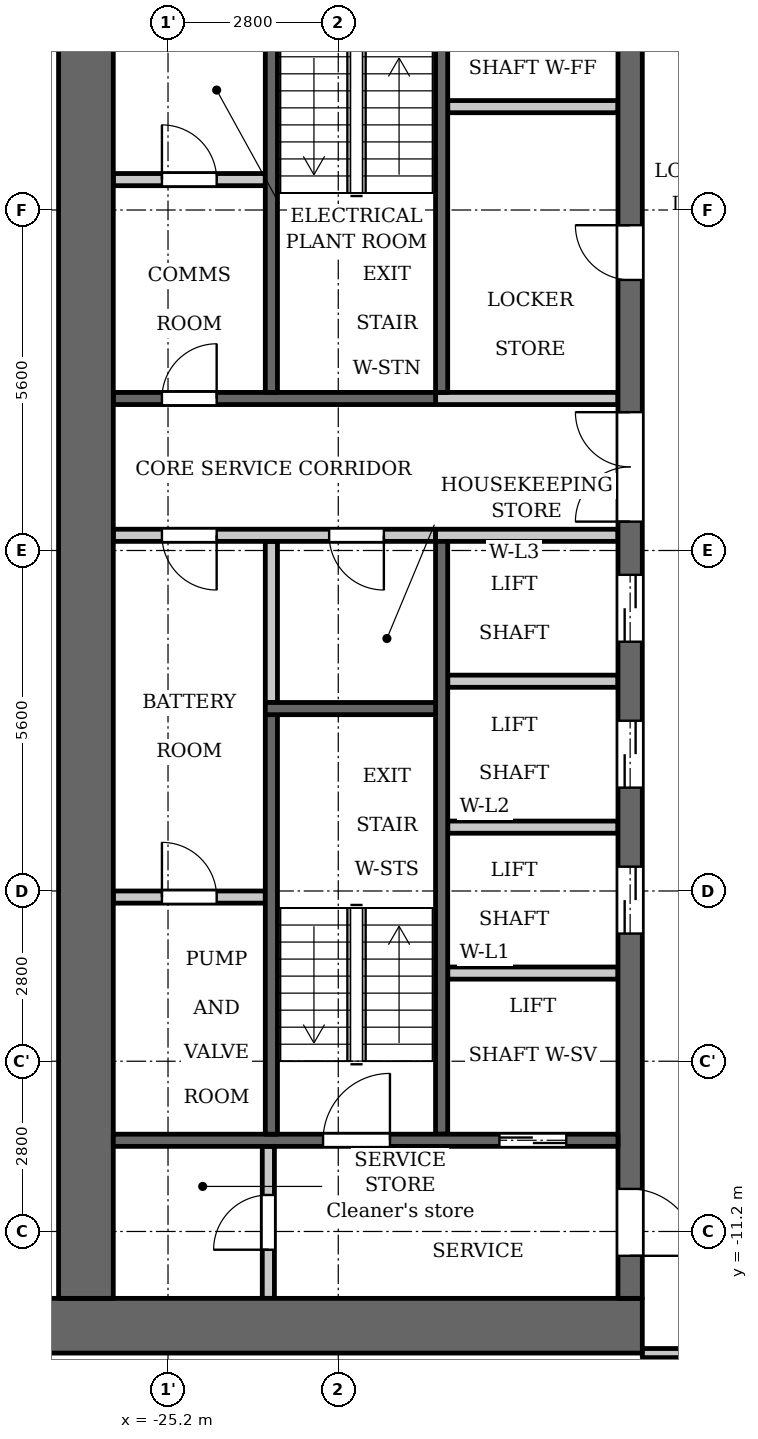
"""IFC4 building model, lengths in metres.
Left out: names, types, materials, properties, quantities, classifications, styles, units other than length and angle.
Written with IfcOpenShell. Run it as: python <this file> out.ifc"""

import sys

from ifc_helpers import new_model, si_unit, direction, frame, frame_2d, origin, place, context, subcontext, project, spatial, rectangle, extrude, element, fill, save


model = new_model("IFC4")
c1 = context("Model", 3, precision=1e-05, world=origin(), true_north=direction((0.0, 1.0)))
c2 = subcontext(c1, "Body", "Model", "MODEL_VIEW")
j1 = project(units=[si_unit("LENGTHUNIT", "METRE"), si_unit("PLANEANGLEUNIT", "RADIAN")], contexts=[c1])
p1 = place(None, origin())
s1 = spatial("IfcSite", under=j1, at=p1, CompositionType="ELEMENT")
p2 = place(p1, origin())
s2 = spatial("IfcBuilding", under=s1, at=p2, CompositionType="ELEMENT")
p3 = place(p2, frame((0.0, 0.0, 97.3)))
s3 = spatial("IfcBuildingStorey", under=s2, at=p3, CompositionType="ELEMENT", Elevation=97.3)
p4 = place(p3, frame((-23.5, -2.5, 0.0), z_axis=(0.0, 0.0, 1.0), x_axis=(0.0, 1.0, 0.0)))
e1 = element("IfcWall", 1, at=p4, inside=s3, PredefinedType="PARTITIONING", context=c2, shape_type="SweptSolid", body=[
    extrude(rectangle(XDim=2.65, YDim=0.2, at=frame_2d((1.325, 0.0))), origin(), (0.0, 0.0, 1.0), 3.2),
])
p5 = place(p3, frame((-20.7, 2.6, 0.0), z_axis=(0.0, 0.0, 1.0), x_axis=(0.0, 1.0, 0.0)))
e2 = element("IfcWall", 2, at=p5, inside=s3, PredefinedType="SHEAR", context=c2, shape_type="SweptSolid", body=[
    extrude(rectangle(XDim=7.0, YDim=0.2, at=frame_2d((3.5, 0.0))), origin(), (0.0, 0.0, 1.0), 3.2),
])
p6 = place(p3, frame((-20.7, -9.6, 0.0), z_axis=(0.0, 0.0, 1.0), x_axis=(0.0, 1.0, 0.0)))
e3 = element("IfcWall", 3, at=p6, inside=s3, PredefinedType="SHEAR", context=c2, shape_type="SweptSolid", body=[
    extrude(rectangle(XDim=9.75, YDim=0.2, at=frame_2d((4.875, 0.0))), origin(), (0.0, 0.0, 1.0), 3.2),
])
p7 = place(p3, frame((-20.8, 2.5, 0.0), z_axis=(0.0, 0.0, 1.0), x_axis=(-1.0, 0.0, 0.0)))
e4 = element("IfcWall", 4, at=p7, inside=s3, PredefinedType="SHEAR", context=c2, shape_type="SweptSolid", body=[
    extrude(rectangle(XDim=5.3, YDim=0.2, at=frame_2d((2.65, 0.0))), origin(), (0.0, 0.0, 1.0), 3.2),
])
p8 = place(p7, frame((3.6, 0.0, 0.0)))
e5 = element("IfcOpeningElement", 5, at=p8, cuts=e4, PredefinedType="OPENING", context=c2, shape_type="SweptSolid", body=[
    extrude(rectangle(XDim=0.9, YDim=2.1, at=frame_2d((0.45, 1.05))), frame((0.0, 0.11, 0.0), z_axis=(0.0, -1.0, 0.0), x_axis=(1.0, 0.0, 0.0)), (0.0, 0.0, 1.0), 0.22),
])
p9 = place(p3, frame((-20.8, 0.25, 0.0), z_axis=(0.0, 0.0, 1.0), x_axis=(-1.0, 0.0, 0.0)))
e6 = element("IfcWall", 6, at=p9, inside=s3, PredefinedType="PARTITIONING", context=c2, shape_type="SweptSolid", body=[
    extrude(rectangle(XDim=5.3, YDim=0.2, at=frame_2d((2.65, 0.0))), origin(), (0.0, 0.0, 1.0), 3.2),
])
p10 = place(p9, frame((0.85, 0.0, 0.0)))
e7 = element("IfcOpeningElement", 7, at=p10, cuts=e6, PredefinedType="OPENING", context=c2, shape_type="SweptSolid", body=[
    extrude(rectangle(XDim=0.9, YDim=2.1, at=frame_2d((0.45, 1.05))), frame((0.0, 0.11, 0.0), z_axis=(0.0, -1.0, 0.0), x_axis=(1.0, 0.0, 0.0)), (0.0, 0.0, 1.0), 0.22),
])
p11 = place(p9, frame((3.6, 0.0, 0.0)))
e8 = element("IfcOpeningElement", 8, at=p11, cuts=e6, PredefinedType="OPENING", context=c2, shape_type="SweptSolid", body=[
    extrude(rectangle(XDim=0.9, YDim=2.1, at=frame_2d((0.45, 1.05))), frame((0.0, 0.11, 0.0), z_axis=(0.0, -1.0, 0.0), x_axis=(1.0, 0.0, 0.0)), (0.0, 0.0, 1.0), 0.22),
])
p12 = place(p3, frame((-17.4, -12.75, 0.0), z_axis=(0.0, 0.0, 1.0), x_axis=(-1.0, 0.0, 0.0)))
e9 = element("IfcWall", 9, at=p12, inside=s3, PredefinedType="SHEAR", context=c2, shape_type="SweptSolid", body=[
    extrude(rectangle(XDim=10.4, YDim=0.9, at=frame_2d((5.2, 0.0))), origin(), (0.0, 0.0, 1.0), 3.2),
])
p13 = place(p3, frame((-17.6, -12.3, 0.0), z_axis=(0.0, 0.0, 1.0), x_axis=(0.0, 1.0, 0.0)))
e10 = element("IfcWall", 10, at=p13, inside=s3, PredefinedType="SHEAR", context=c2, shape_type="SweptSolid", body=[
    extrude(rectangle(XDim=24.6, YDim=0.4, at=frame_2d((12.3, 0.0))), origin(), (0.0, 0.0, 1.0), 3.2),
])
p14 = place(p13, frame((6.0, 0.0, 0.0)))
e11 = element("IfcOpeningElement", 11, at=p14, cuts=e10, PredefinedType="OPENING", context=c2, shape_type="SweptSolid", body=[
    extrude(rectangle(XDim=1.1, YDim=2.1, at=frame_2d((0.55, 1.05))), frame((0.0, 0.21, 0.0), z_axis=(0.0, -1.0, 0.0), x_axis=(1.0, 0.0, 0.0)), (0.0, 0.0, 1.0), 0.42),
])
p15 = place(p13, frame((8.4, 0.0, 0.0)))
e12 = element("IfcOpeningElement", 12, at=p15, cuts=e10, PredefinedType="OPENING", context=c2, shape_type="SweptSolid", body=[
    extrude(rectangle(XDim=1.1, YDim=2.1, at=frame_2d((0.55, 1.05))), frame((0.0, 0.21, 0.0), z_axis=(0.0, -1.0, 0.0), x_axis=(1.0, 0.0, 0.0)), (0.0, 0.0, 1.0), 0.42),
])
p16 = place(p13, frame((10.8, 0.0, 0.0)))
e13 = element("IfcOpeningElement", 13, at=p16, cuts=e10, PredefinedType="OPENING", context=c2, shape_type="SweptSolid", body=[
    extrude(rectangle(XDim=1.1, YDim=2.1, at=frame_2d((0.55, 1.05))), frame((0.0, 0.21, 0.0), z_axis=(0.0, -1.0, 0.0), x_axis=(1.0, 0.0, 0.0)), (0.0, 0.0, 1.0), 0.42),
])
p17 = place(p13, frame((16.75, 0.0, 0.0)))
e14 = element("IfcOpeningElement", 14, at=p17, cuts=e10, PredefinedType="OPENING", context=c2, shape_type="SweptSolid", body=[
    extrude(rectangle(XDim=0.9, YDim=2.1, at=frame_2d((0.45, 1.05))), frame((0.0, 0.21, 0.0), z_axis=(0.0, -1.0, 0.0), x_axis=(1.0, 0.0, 0.0)), (0.0, 0.0, 1.0), 0.42),
])
p18 = place(p13, frame((22.8, 0.0, 0.0)))
e15 = element("IfcOpeningElement", 15, at=p18, cuts=e10, PredefinedType="OPENING", context=c2, shape_type="SweptSolid", body=[
    extrude(rectangle(XDim=1.1, YDim=2.1, at=frame_2d((0.55, 1.05))), frame((0.0, 0.21, 0.0), z_axis=(0.0, -1.0, 0.0), x_axis=(1.0, 0.0, 0.0)), (0.0, 0.0, 1.0), 0.42),
])
p19 = place(p13, frame((0.7, 0.0, 0.0)))
e16 = element("IfcOpeningElement", 16, at=p19, cuts=e10, PredefinedType="OPENING", context=c2, shape_type="SweptSolid", body=[
    extrude(rectangle(XDim=1.1, YDim=2.1, at=frame_2d((0.55, 1.05))), frame((0.0, 0.21, 0.0), z_axis=(0.0, -1.0, 0.0), x_axis=(1.0, 0.0, 0.0)), (0.0, 0.0, 1.0), 0.42),
])
p20 = place(p13, frame((12.775, 0.0, 0.0)))
e17 = element("IfcOpeningElement", 17, at=p20, cuts=e10, PredefinedType="OPENING", context=c2, shape_type="SweptSolid", body=[
    extrude(rectangle(XDim=1.8, YDim=2.1, at=frame_2d((0.9, 1.05))), frame((0.0, 0.21, 0.0), z_axis=(0.0, -1.0, 0.0), x_axis=(1.0, 0.0, 0.0)), (0.0, 0.0, 1.0), 0.42),
])
p21 = place(p3, frame((-26.55, -12.3, 0.0), z_axis=(0.0, 0.0, 1.0), x_axis=(0.0, 1.0, 0.0)))
e18 = element("IfcWall", 18, at=p21, inside=s3, PredefinedType="SHEAR", context=c2, shape_type="SweptSolid", body=[
    extrude(rectangle(XDim=24.6, YDim=0.9, at=frame_2d((12.3, 0.0))), origin(), (0.0, 0.0, 1.0), 3.2),
])
p22 = place(p3, frame((-23.55, -12.3, 0.0), z_axis=(0.0, 0.0, 1.0), x_axis=(0.0, 1.0, 0.0)))
e19 = element("IfcWall", 19, at=p22, inside=s3, PredefinedType="PARTITIONING", context=c2, shape_type="SweptSolid", body=[
    extrude(rectangle(XDim=2.5, YDim=0.2, at=frame_2d((1.25, 0.0))), origin(), (0.0, 0.0, 1.0), 3.2),
])
p23 = place(p22, frame((0.8, 0.0, 0.0)))
e20 = element("IfcOpeningElement", 20, at=p23, cuts=e19, PredefinedType="OPENING", context=c2, shape_type="SweptSolid", body=[
    extrude(rectangle(XDim=0.9, YDim=2.1, at=frame_2d((0.45, 1.05))), frame((0.0, 0.11, 0.0), z_axis=(0.0, -1.0, 0.0), x_axis=(1.0, 0.0, 0.0)), (0.0, 0.0, 1.0), 0.22),
])
p24 = place(p3, frame((-23.6, -5.7, 0.0), z_axis=(0.0, 0.0, 1.0), x_axis=(-1.0, 0.0, 0.0)))
e21 = element("IfcWall", 21, at=p24, inside=s3, PredefinedType="PARTITIONING", context=c2, shape_type="SweptSolid", body=[
    extrude(rectangle(XDim=2.5, YDim=0.2, at=frame_2d((1.25, 0.0))), origin(), (0.0, 0.0, 1.0), 3.2),
])
p25 = place(p24, frame((0.8, 0.0, 0.0)))
e22 = element("IfcOpeningElement", 22, at=p25, cuts=e21, PredefinedType="OPENING", context=c2, shape_type="SweptSolid", body=[
    extrude(rectangle(XDim=0.9, YDim=2.1, at=frame_2d((0.45, 1.05))), frame((0.0, 0.11, 0.0), z_axis=(0.0, -1.0, 0.0), x_axis=(1.0, 0.0, 0.0)), (0.0, 0.0, 1.0), 0.22),
])
p26 = place(p3, frame((-23.6, 6.1, 0.0), z_axis=(0.0, 0.0, 1.0), x_axis=(-1.0, 0.0, 0.0)))
e23 = element("IfcWall", 23, at=p26, inside=s3, PredefinedType="PARTITIONING", context=c2, shape_type="SweptSolid", body=[
    extrude(rectangle(XDim=2.5, YDim=0.2, at=frame_2d((1.25, 0.0))), origin(), (0.0, 0.0, 1.0), 3.2),
])
p27 = place(p26, frame((0.8, 0.0, 0.0)))
e24 = element("IfcOpeningElement", 24, at=p27, cuts=e23, PredefinedType="OPENING", context=c2, shape_type="SweptSolid", body=[
    extrude(rectangle(XDim=0.9, YDim=2.1, at=frame_2d((0.45, 1.05))), frame((0.0, 0.11, 0.0), z_axis=(0.0, -1.0, 0.0), x_axis=(1.0, 0.0, 0.0)), (0.0, 0.0, 1.0), 0.22),
])
p28 = place(p3, frame((-17.8, -9.7, 0.0), z_axis=(0.0, 0.0, 1.0), x_axis=(-1.0, 0.0, 0.0)))
e25 = element("IfcWall", 25, at=p28, inside=s3, PredefinedType="SHEAR", context=c2, shape_type="SweptSolid", body=[
    extrude(rectangle(XDim=8.3, YDim=0.2, at=frame_2d((4.15, 0.0))), origin(), (0.0, 0.0, 1.0), 3.2),
])
p29 = place(p28, frame((0.85, 0.0, 0.0)))
e26 = element("IfcOpeningElement", 26, at=p29, cuts=e25, PredefinedType="OPENING", context=c2, shape_type="SweptSolid", body=[
    extrude(rectangle(XDim=1.1, YDim=2.1, at=frame_2d((0.55, 1.05))), frame((0.0, 0.11, 0.0), z_axis=(0.0, -1.0, 0.0), x_axis=(1.0, 0.0, 0.0)), (0.0, 0.0, 1.0), 0.22),
])
p30 = place(p28, frame((3.75, 0.0, 0.0)))
e27 = element("IfcOpeningElement", 27, at=p30, cuts=e25, PredefinedType="OPENING", context=c2, shape_type="SweptSolid", body=[
    extrude(rectangle(XDim=1.1, YDim=2.1, at=frame_2d((0.55, 1.05))), frame((0.0, 0.11, 0.0), z_axis=(0.0, -1.0, 0.0), x_axis=(1.0, 0.0, 0.0)), (0.0, 0.0, 1.0), 0.22),
])
for number, where, z_axis, x_axis in (
    (28, (-17.8, -6.95, 0.0), (0.0, 0.0, 1.0), (-1.0, 0.0, 0.0)),
    (29, (-17.8, -4.55, 0.0), (0.0, 0.0, 1.0), (-1.0, 0.0, 0.0)),
    (30, (-17.8, -2.15, 0.0), (0.0, 0.0, 1.0), (-1.0, 0.0, 0.0)),
):
    element("IfcWall", number, at=place(p3, frame(where, z_axis=z_axis, x_axis=x_axis)), inside=s3, PredefinedType="PARTITIONING", context=c2, shape_type="SweptSolid", body=[
        extrude(rectangle(XDim=2.8, YDim=0.2, at=frame_2d((1.4, 0.0))), origin(), (0.0, 0.0, 1.0), 3.2),
    ])
for number, where, z_axis, x_axis in (
    (31, (-17.8, 0.25, 0.0), (0.0, 0.0, 1.0), (-1.0, 0.0, 0.0)),
    (32, (-17.8, 2.5, 0.0), (0.0, 0.0, 1.0), (-1.0, 0.0, 0.0)),
):
    element("IfcWall", number, at=place(p3, frame(where, z_axis=z_axis, x_axis=x_axis)), inside=s3, PredefinedType="PARTITIONING", context=c2, shape_type="SweptSolid", body=[
        extrude(rectangle(XDim=3.0, YDim=0.2, at=frame_2d((1.5, 0.0))), origin(), (0.0, 0.0, 1.0), 3.2),
    ])
p31 = place(p3, frame((-17.8, 7.3, 0.0), z_axis=(0.0, 0.0, 1.0), x_axis=(-1.0, 0.0, 0.0)))
e33 = element("IfcWall", 33, at=p31, inside=s3, PredefinedType="PARTITIONING", context=c2, shape_type="SweptSolid", body=[
    extrude(rectangle(XDim=2.8, YDim=0.2, at=frame_2d((1.4, 0.0))), origin(), (0.0, 0.0, 1.0), 3.2),
])
p32 = place(p3, frame((-23.5, 2.6, 0.0), z_axis=(0.0, 0.0, 1.0), x_axis=(0.0, 1.0, 0.0)))
e34 = element("IfcWall", 34, at=p32, inside=s3, PredefinedType="SHEAR", context=c2, shape_type="SweptSolid", body=[
    extrude(rectangle(XDim=7.0, YDim=0.2, at=frame_2d((3.5, 0.0))), origin(), (0.0, 0.0, 1.0), 3.2),
])
p33 = place(p3, frame((-23.5, -9.6, 0.0), z_axis=(0.0, 0.0, 1.0), x_axis=(0.0, 1.0, 0.0)))
e35 = element("IfcWall", 35, at=p33, inside=s3, PredefinedType="SHEAR", context=c2, shape_type="SweptSolid", body=[
    extrude(rectangle(XDim=6.9, YDim=0.2, at=frame_2d((3.45, 0.0))), origin(), (0.0, 0.0, 1.0), 3.2),
])
p34 = place(p3, frame((-20.8, -2.6, 0.0), z_axis=(0.0, 0.0, 1.0), x_axis=(-1.0, 0.0, 0.0)))
e36 = element("IfcWall", 36, at=p34, inside=s3, PredefinedType="SHEAR", context=c2, shape_type="SweptSolid", body=[
    extrude(rectangle(XDim=2.8, YDim=0.2, at=frame_2d((1.4, 0.0))), origin(), (0.0, 0.0, 1.0), 3.2),
])
p35 = place(p3, frame((-17.4, -13.2, 0.0), z_axis=(0.0, 0.0, 1.0), x_axis=(1.0, 0.0, 0.0)))
e37 = element("IfcWall", 37, at=p35, inside=s3, PredefinedType="PARTITIONING", context=c2, shape_type="SweptSolid", body=[
    extrude(rectangle(XDim=34.8, YDim=0.15, at=frame_2d((17.4, 0.0))), origin(), (0.0, 0.0, 1.0), 3.2),
])
p36 = place(p35, frame((0.65, 0.0, 0.0)))
e38 = element("IfcOpeningElement", 38, at=p36, cuts=e37, PredefinedType="OPENING", context=c2, shape_type="SweptSolid", body=[
    extrude(rectangle(XDim=1.0, YDim=2.1, at=frame_2d((0.5, 1.05))), frame((0.0, 0.085, 0.0), z_axis=(0.0, -1.0, 0.0), x_axis=(1.0, 0.0, 0.0)), (0.0, 0.0, 1.0), 0.17),
])
p37 = place(p35, frame((33.05, 0.0, 0.0)))
e39 = element("IfcOpeningElement", 39, at=p37, cuts=e37, PredefinedType="OPENING", context=c2, shape_type="SweptSolid", body=[
    extrude(rectangle(XDim=1.0, YDim=2.1, at=frame_2d((0.5, 1.05))), frame((0.0, 0.085, 0.0), z_axis=(0.0, -1.0, 0.0), x_axis=(1.0, 0.0, 0.0)), (0.0, 0.0, 1.0), 0.17),
])
p38 = place(p35, frame((4.55, 0.0, 0.0)))
e40 = element("IfcOpeningElement", 40, at=p38, cuts=e37, PredefinedType="OPENING", context=c2, shape_type="SweptSolid", body=[
    extrude(rectangle(XDim=1.0, YDim=2.1, at=frame_2d((0.5, 1.05))), frame((0.0, 0.085, 0.0), z_axis=(0.0, -1.0, 0.0), x_axis=(1.0, 0.0, 0.0)), (0.0, 0.0, 1.0), 0.17),
])
p39 = place(p35, frame((21.35, 0.0, 0.0)))
e41 = element("IfcOpeningElement", 41, at=p39, cuts=e37, PredefinedType="OPENING", context=c2, shape_type="SweptSolid", body=[
    extrude(rectangle(XDim=1.0, YDim=2.1, at=frame_2d((0.5, 1.05))), frame((0.0, 0.085, 0.0), z_axis=(0.0, -1.0, 0.0), x_axis=(1.0, 0.0, 0.0)), (0.0, 0.0, 1.0), 0.17),
])
p40 = place(p35, frame((30.75, 0.0, 0.0)))
e42 = element("IfcOpeningElement", 42, at=p40, cuts=e37, PredefinedType="OPENING", context=c2, shape_type="SweptSolid", body=[
    extrude(rectangle(XDim=1.0, YDim=2.1, at=frame_2d((0.5, 1.05))), frame((0.0, 0.085, 0.0), z_axis=(0.0, -1.0, 0.0), x_axis=(1.0, 0.0, 0.0)), (0.0, 0.0, 1.0), 0.17),
])
p41 = place(p29, origin())
e43 = element("IfcDoor", 43, at=p41, inside=s3, OperationType="DOUBLE_DOOR_SLIDING", PredefinedType="DOOR", context=c2, shape_type="SweptSolid", body=[
    extrude(rectangle(XDim=1.1, YDim=2.1, at=frame_2d((0.55, 1.05))), frame((0.0, 0.025, 0.0), z_axis=(0.0, -1.0, 0.0), x_axis=(1.0, 0.0, 0.0)), (0.0, 0.0, 1.0), 0.05),
])
fill(e26, e43)
p42 = place(p14, origin())
e44 = element("IfcDoor", 44, at=p42, inside=s3, OperationType="DOUBLE_DOOR_SLIDING", PredefinedType="DOOR", context=c2, shape_type="SweptSolid", body=[
    extrude(rectangle(XDim=1.1, YDim=2.1, at=frame_2d((0.55, 1.05))), frame((0.0, 0.025, 0.0), z_axis=(0.0, -1.0, 0.0), x_axis=(1.0, 0.0, 0.0)), (0.0, 0.0, 1.0), 0.05),
])
fill(e11, e44)
p43 = place(p15, origin())
e45 = element("IfcDoor", 45, at=p43, inside=s3, OperationType="DOUBLE_DOOR_SLIDING", PredefinedType="DOOR", context=c2, shape_type="SweptSolid", body=[
    extrude(rectangle(XDim=1.1, YDim=2.1, at=frame_2d((0.55, 1.05))), frame((0.0, 0.025, 0.0), z_axis=(0.0, -1.0, 0.0), x_axis=(1.0, 0.0, 0.0)), (0.0, 0.0, 1.0), 0.05),
])
fill(e12, e45)
p44 = place(p16, origin())
e46 = element("IfcDoor", 46, at=p44, inside=s3, OperationType="DOUBLE_DOOR_SLIDING", PredefinedType="DOOR", context=c2, shape_type="SweptSolid", body=[
    extrude(rectangle(XDim=1.1, YDim=2.1, at=frame_2d((0.55, 1.05))), frame((0.0, 0.025, 0.0), z_axis=(0.0, -1.0, 0.0), x_axis=(1.0, 0.0, 0.0)), (0.0, 0.0, 1.0), 0.05),
])
fill(e13, e46)
p45 = place(p17, origin())
e47 = element("IfcDoor", 47, at=p45, inside=s3, OperationType="SINGLE_SWING_LEFT", PredefinedType="DOOR", context=c2, shape_type="SweptSolid", body=[
    extrude(rectangle(XDim=0.9, YDim=2.1, at=frame_2d((0.45, 1.05))), frame((0.0, 0.025, 0.0), z_axis=(0.0, -1.0, 0.0), x_axis=(1.0, 0.0, 0.0)), (0.0, 0.0, 1.0), 0.05),
])
fill(e14, e47)
p46 = place(p19, origin())
e48 = element("IfcDoor", 48, at=p46, inside=s3, OperationType="SINGLE_SWING_LEFT", PredefinedType="DOOR", context=c2, shape_type="SweptSolid", body=[
    extrude(rectangle(XDim=1.1, YDim=2.1, at=frame_2d((0.55, 1.05))), frame((0.0, 0.025, 0.0), z_axis=(0.0, -1.0, 0.0), x_axis=(1.0, 0.0, 0.0)), (0.0, 0.0, 1.0), 0.05),
])
fill(e16, e48)
p47 = place(p23, origin())
e49 = element("IfcDoor", 49, at=p47, inside=s3, OperationType="SINGLE_SWING_RIGHT", PredefinedType="DOOR", context=c2, shape_type="SweptSolid", body=[
    extrude(rectangle(XDim=0.9, YDim=2.1, at=frame_2d((0.45, 1.05))), frame((0.0, 0.025, 0.0), z_axis=(0.0, -1.0, 0.0), x_axis=(1.0, 0.0, 0.0)), (0.0, 0.0, 1.0), 0.05),
])
fill(e20, e49)
p48 = place(p30, origin())
e50 = element("IfcDoor", 50, at=p48, inside=s3, OperationType="SINGLE_SWING_LEFT", PredefinedType="DOOR", context=c2, shape_type="SweptSolid", body=[
    extrude(rectangle(XDim=1.1, YDim=2.1, at=frame_2d((0.55, 1.05))), frame((0.0, 0.025, 0.0), z_axis=(0.0, -1.0, 0.0), x_axis=(1.0, 0.0, 0.0)), (0.0, 0.0, 1.0), 0.05),
])
fill(e27, e50)
p49 = place(p20, origin())
e51 = element("IfcDoor", 51, at=p49, inside=s3, OperationType="DOUBLE_DOOR_SINGLE_SWING", PredefinedType="DOOR", context=c2, shape_type="SweptSolid", body=[
    extrude(rectangle(XDim=1.8, YDim=2.1, at=frame_2d((0.9, 1.05))), frame((0.0, 0.025, 0.0), z_axis=(0.0, -1.0, 0.0), x_axis=(1.0, 0.0, 0.0)), (0.0, 0.0, 1.0), 0.05),
])
fill(e17, e51)
p50 = place(p10, origin())
e52 = element("IfcDoor", 52, at=p50, inside=s3, OperationType="SINGLE_SWING_RIGHT", PredefinedType="DOOR", context=c2, shape_type="SweptSolid", body=[
    extrude(rectangle(XDim=0.9, YDim=2.1, at=frame_2d((0.45, 1.05))), frame((0.0, 0.025, 0.0), z_axis=(0.0, -1.0, 0.0), x_axis=(1.0, 0.0, 0.0)), (0.0, 0.0, 1.0), 0.05),
])
fill(e7, e52)
p51 = place(p25, origin())
e53 = element("IfcDoor", 53, at=p51, inside=s3, OperationType="SINGLE_SWING_RIGHT", PredefinedType="DOOR", context=c2, shape_type="SweptSolid", body=[
    extrude(rectangle(XDim=0.9, YDim=2.1, at=frame_2d((0.45, 1.05))), frame((0.0, 0.025, 0.0), z_axis=(0.0, -1.0, 0.0), x_axis=(1.0, 0.0, 0.0)), (0.0, 0.0, 1.0), 0.05),
])
fill(e22, e53)
p52 = place(p11, origin())
e54 = element("IfcDoor", 54, at=p52, inside=s3, OperationType="SINGLE_SWING_RIGHT", PredefinedType="DOOR", context=c2, shape_type="SweptSolid", body=[
    extrude(rectangle(XDim=0.9, YDim=2.1, at=frame_2d((0.45, 1.05))), frame((0.0, 0.025, 0.0), z_axis=(0.0, -1.0, 0.0), x_axis=(1.0, 0.0, 0.0)), (0.0, 0.0, 1.0), 0.05),
])
fill(e8, e54)
p53 = place(p27, origin())
e55 = element("IfcDoor", 55, at=p53, inside=s3, OperationType="SINGLE_SWING_RIGHT", PredefinedType="DOOR", context=c2, shape_type="SweptSolid", body=[
    extrude(rectangle(XDim=0.9, YDim=2.1, at=frame_2d((0.45, 1.05))), frame((0.0, 0.025, 0.0), z_axis=(0.0, -1.0, 0.0), x_axis=(1.0, 0.0, 0.0)), (0.0, 0.0, 1.0), 0.05),
])
fill(e24, e55)
p54 = place(p8, origin())
e56 = element("IfcDoor", 56, at=p54, inside=s3, OperationType="SINGLE_SWING_LEFT", PredefinedType="DOOR", context=c2, shape_type="SweptSolid", body=[
    extrude(rectangle(XDim=0.9, YDim=2.1, at=frame_2d((0.45, 1.05))), frame((0.0, 0.025, 0.0), z_axis=(0.0, -1.0, 0.0), x_axis=(1.0, 0.0, 0.0)), (0.0, 0.0, 1.0), 0.05),
])
fill(e5, e56)
save(model, sys.argv[1])
